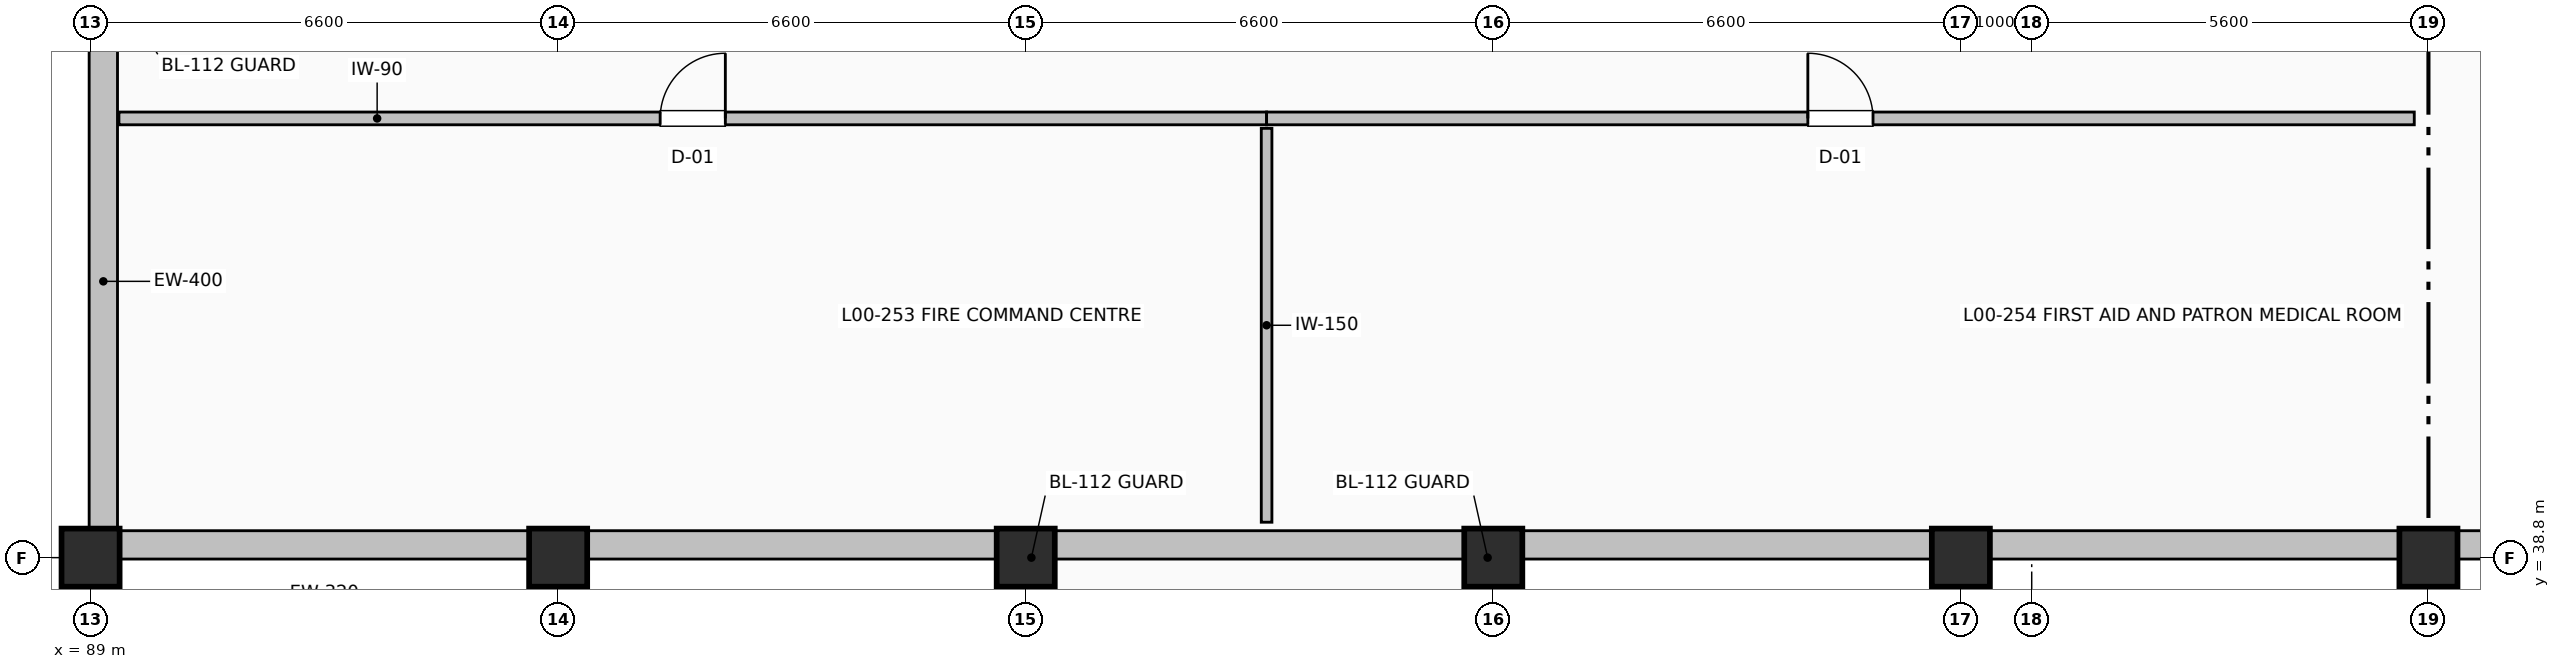
"""IFC4 building model, lengths in metres.
Left out: names, types, materials, properties, quantities, classifications, styles, units other than length and angle.
Written with IfcOpenShell. Run it as: python <this file> out.ifc"""

import sys

from ifc_helpers import new_model, si_unit, direction, frame, frame_2d, origin, origin_2d, place, context, subcontext, project, spatial, rectangle, extrude, element, fill, save


model = new_model("IFC4")
c1 = context("Model", 3, precision=1e-05, world=origin(), true_north=direction((0.0, 1.0)))
c2 = subcontext(c1, "Body", "Model", "MODEL_VIEW")
j1 = project(units=[si_unit("LENGTHUNIT", "METRE"), si_unit("PLANEANGLEUNIT", "RADIAN")], contexts=[c1])
p1 = place(None, origin())
s1 = spatial("IfcSite", under=j1, at=p1, CompositionType="ELEMENT")
p2 = place(p1, origin())
s2 = spatial("IfcBuilding", under=s1, at=p2, CompositionType="ELEMENT")
p3 = place(p2, origin())
s3 = spatial("IfcBuildingStorey", under=s2, at=p3, CompositionType="ELEMENT", Elevation=0.0)
for number, where, z_axis, x_axis in (
    (1, (89.0, 38.8, 0.0), (0.0, 0.0, 1.0), (1.0, 0.0, 0.0)),
    (2, (95.6, 38.8, 0.0), (0.0, 0.0, 1.0), (1.0, 0.0, 0.0)),
    (3, (102.2, 38.8, 0.0), (0.0, 0.0, 1.0), (1.0, 0.0, 0.0)),
    (4, (108.8, 38.8, 0.0), (0.0, 0.0, 1.0), (1.0, 0.0, 0.0)),
    (5, (115.4, 38.8, 0.0), (0.0, 0.0, 1.0), (1.0, 0.0, 0.0)),
    (6, (122.0, 38.8, 0.0), (0.0, 0.0, 1.0), (1.0, 0.0, 0.0)),
):
    element("IfcColumn", number, at=place(p3, frame(where, z_axis=z_axis, x_axis=x_axis)), inside=s3, PredefinedType="COLUMN", context=c2, shape_type="SweptSolid", body=[
        extrude(rectangle(XDim=0.82, YDim=0.82, at=origin_2d()), origin(), (0.0, 0.0, 1.0), 5.4),
    ])
for number, where, z_axis, x_axis in (
    (7, (128.19, 38.98, 0.0), (0.0, 0.0, 1.0), (-1.0, 0.0, 0.0)),
    (8, (121.59, 38.98, 0.0), (0.0, 0.0, 1.0), (-1.0, 0.0, 0.0)),
    (9, (114.99, 38.98, 0.0), (0.0, 0.0, 1.0), (-1.0, 0.0, 0.0)),
):
    element("IfcWall", number, at=place(p3, frame(where, z_axis=z_axis, x_axis=x_axis)), inside=s3, PredefinedType="SOLIDWALL", context=c2, shape_type="SweptSolid", body=[
        extrude(rectangle(XDim=5.78, YDim=0.4, at=frame_2d((2.89, 0.0))), origin(), (0.0, 0.0, 1.0), 4.342),
    ])
p4 = place(p3, frame((108.39, 38.98, 0.0), z_axis=(0.0, 0.0, 1.0), x_axis=(-1.0, 0.0, 0.0)))
e10 = element("IfcWall", 10, at=p4, inside=s3, PredefinedType="SOLIDWALL", context=c2, shape_type="SweptSolid", body=[
    extrude(rectangle(XDim=5.78, YDim=0.4, at=frame_2d((2.89, 0.0))), origin(), (0.0, 0.0, 1.0), 4.342),
])
for number, where, z_axis, x_axis in (
    (11, (101.79, 38.98, 0.0), (0.0, 0.0, 1.0), (-1.0, 0.0, 0.0)),
    (12, (95.19, 38.98, 0.0), (0.0, 0.0, 1.0), (-1.0, 0.0, 0.0)),
):
    element("IfcWall", number, at=place(p3, frame(where, z_axis=z_axis, x_axis=x_axis)), inside=s3, PredefinedType="SOLIDWALL", context=c2, shape_type="SweptSolid", body=[
        extrude(rectangle(XDim=5.78, YDim=0.4, at=frame_2d((2.89, 0.0))), origin(), (0.0, 0.0, 1.0), 4.342),
    ])
p5 = place(p3, frame((89.18, 39.21, 0.0), z_axis=(0.0, 0.0, 1.0), x_axis=(0.0, 1.0, 0.0)))
e13 = element("IfcWall", 13, at=p5, inside=s3, PredefinedType="SOLIDWALL", context=c2, shape_type="SweptSolid", body=[
    extrude(rectangle(XDim=6.98, YDim=0.4, at=frame_2d((3.49, 0.0))), origin(), (0.0, 0.0, 1.0), 4.342),
])
p6 = place(p3, frame((89.4, 45.0, 0.0), z_axis=(0.0, 0.0, 1.0), x_axis=(1.0, 0.0, 0.0)))
e14 = element("IfcWall", 14, at=p6, inside=s3, PredefinedType="PARTITIONING", context=c2, shape_type="SweptSolid", body=[
    extrude(rectangle(XDim=16.2, YDim=0.18, at=frame_2d((8.1, 0.0))), origin(), (0.0, 0.0, 1.0), 5.092),
])
p7 = place(p6, frame((7.64, 0.0, 0.0)))
e15 = element("IfcOpeningElement", 15, at=p7, cuts=e14, PredefinedType="OPENING", context=c2, shape_type="SweptSolid", body=[
    extrude(rectangle(XDim=0.92, YDim=2.05, at=frame_2d((0.46, 1.025))), frame((0.0, 0.1, 0.0), z_axis=(0.0, -1.0, 0.0), x_axis=(1.0, 0.0, 0.0)), (0.0, 0.0, 1.0), 0.2),
])
p8 = place(p3, frame((105.6, 39.3, 0.0), z_axis=(0.0, 0.0, 1.0), x_axis=(0.0, 1.0, 0.0)))
e16 = element("IfcWall", 16, at=p8, inside=s3, PredefinedType="PARTITIONING", context=c2, shape_type="SweptSolid", body=[
    extrude(rectangle(XDim=5.56, YDim=0.15, at=frame_2d((2.78, 0.0))), origin(), (0.0, 0.0, 1.0), 5.092),
])
p9 = place(p3, frame((105.6, 45.0, 0.0), z_axis=(0.0, 0.0, 1.0), x_axis=(1.0, 0.0, 0.0)))
e17 = element("IfcWall", 17, at=p9, inside=s3, PredefinedType="PARTITIONING", context=c2, shape_type="SweptSolid", body=[
    extrude(rectangle(XDim=16.2, YDim=0.18, at=frame_2d((8.1, 0.0))), origin(), (0.0, 0.0, 1.0), 5.092),
])
p10 = place(p9, frame((7.64, 0.0, 0.0)))
e18 = element("IfcOpeningElement", 18, at=p10, cuts=e17, PredefinedType="OPENING", context=c2, shape_type="SweptSolid", body=[
    extrude(rectangle(XDim=0.92, YDim=2.05, at=frame_2d((0.46, 1.025))), frame((0.0, 0.1, 0.0), z_axis=(0.0, -1.0, 0.0), x_axis=(1.0, 0.0, 0.0)), (0.0, 0.0, 1.0), 0.2),
])
p11 = place(p7, origin())
e19 = element("IfcDoor", 19, at=p11, inside=s3, OperationType="SINGLE_SWING_RIGHT", PredefinedType="DOOR", context=c2, shape_type="SweptSolid", body=[
    extrude(rectangle(XDim=0.92, YDim=2.05, at=frame_2d((0.46, 1.025))), frame((0.0, 0.025, 0.0), z_axis=(0.0, -1.0, 0.0), x_axis=(1.0, 0.0, 0.0)), (0.0, 0.0, 1.0), 0.05),
])
fill(e15, e19)
p12 = place(p10, origin())
e20 = element("IfcDoor", 20, at=p12, inside=s3, OperationType="SINGLE_SWING_LEFT", PredefinedType="DOOR", context=c2, shape_type="SweptSolid", body=[
    extrude(rectangle(XDim=0.92, YDim=2.05, at=frame_2d((0.46, 1.025))), frame((0.0, 0.025, 0.0), z_axis=(0.0, -1.0, 0.0), x_axis=(1.0, 0.0, 0.0)), (0.0, 0.0, 1.0), 0.05),
])
fill(e18, e20)
save(model, sys.argv[1])
